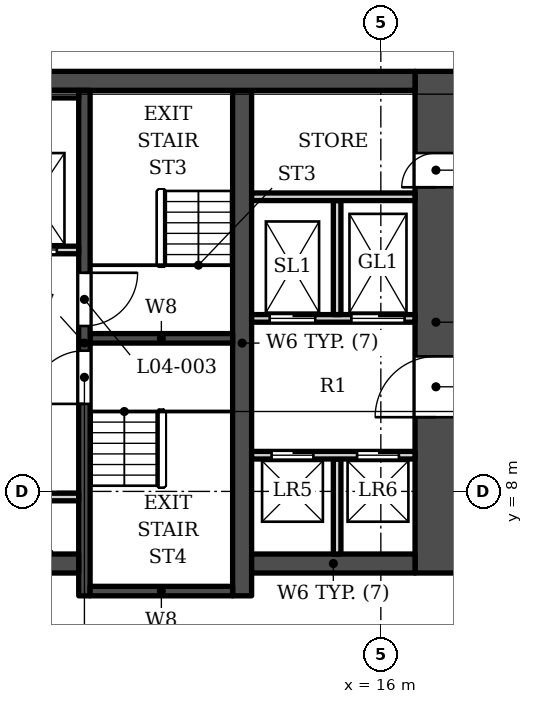
"""IFC4 building model, lengths in metres.
Left out: names, types, materials, properties, quantities, classifications, styles, units other than length and angle.
Written with IfcOpenShell. Run it as: python <this file> out.ifc"""

import sys

from ifc_helpers import new_model, si_unit, direction, frame, frame_2d, origin, place, context, subcontext, project, spatial, rectangle, extrude, element, fill, save


model = new_model("IFC4")
c1 = context("Model", 3, precision=1e-05, world=origin(), true_north=direction((0.0, 1.0)))
c2 = subcontext(c1, "Body", "Model", "MODEL_VIEW")
j1 = project(units=[si_unit("LENGTHUNIT", "METRE"), si_unit("PLANEANGLEUNIT", "RADIAN")], contexts=[c1])
p1 = place(None, origin())
s1 = spatial("IfcSite", under=j1, at=p1, CompositionType="ELEMENT")
p2 = place(p1, origin())
s2 = spatial("IfcBuilding", under=s1, at=p2, CompositionType="ELEMENT")
p3 = place(p2, frame((0.0, 0.0, 34.5)))
s3 = spatial("IfcBuildingStorey", under=s2, at=p3, CompositionType="ELEMENT", Elevation=34.5)
p4 = place(p3, frame((-16.9, 18.802, 0.0), z_axis=(0.0, 0.0, 1.0), x_axis=(1.0, 0.0, 0.0)))
e1 = element("IfcWall", 1, at=p4, inside=s3, PredefinedType="SHEAR", context=c2, shape_type="SweptSolid", body=[
    extrude(rectangle(XDim=33.8, YDim=0.5, at=frame_2d((16.9, 0.0))), origin(), (0.0, 0.0, 1.0), 5.5),
])
p5 = place(p3, frame((12.35, 5.253, 0.0), z_axis=(0.0, 0.0, 1.0), x_axis=(0.0, 1.0, 0.0)))
e2 = element("IfcWall", 2, at=p5, inside=s3, PredefinedType="SHEAR", context=c2, shape_type="SweptSolid", body=[
    extrude(rectangle(XDim=13.3, YDim=0.5, at=frame_2d((6.65, 0.0))), origin(), (0.0, 0.0, 1.0), 5.5),
])
p6 = place(p3, frame((8.2, 5.253, 0.0), z_axis=(0.0, 0.0, 1.0), x_axis=(0.0, 1.0, 0.0)))
e3 = element("IfcWall", 3, at=p6, inside=s3, PredefinedType="SHEAR", context=c2, shape_type="SweptSolid", body=[
    extrude(rectangle(XDim=13.3, YDim=0.3, at=frame_2d((6.65, 0.0))), origin(), (0.0, 0.0, 1.0), 5.5),
])
p7 = place(p6, frame((7.1, 0.0, 0.0)))
e4 = element("IfcOpeningElement", 4, at=p7, cuts=e3, PredefinedType="OPENING", context=c2, shape_type="SweptSolid", body=[
    extrude(rectangle(XDim=1.4, YDim=2.1, at=frame_2d((0.7, 1.05))), frame((0.0, 0.16, 0.0), z_axis=(0.0, -1.0, 0.0), x_axis=(1.0, 0.0, 0.0)), (0.0, 0.0, 1.0), 0.32),
])
p8 = place(p6, frame((5.05, 0.0, 0.0)))
e5 = element("IfcOpeningElement", 5, at=p8, cuts=e3, PredefinedType="OPENING", context=c2, shape_type="SweptSolid", body=[
    extrude(rectangle(XDim=1.4, YDim=2.1, at=frame_2d((0.7, 1.05))), frame((0.0, 0.16, 0.0), z_axis=(0.0, -1.0, 0.0), x_axis=(1.0, 0.0, 0.0)), (0.0, 0.0, 1.0), 0.32),
])
for number, where, z_axis, x_axis in (
    (6, (8.35, 12.028, 0.0), (0.0, 0.0, 1.0), (1.0, 0.0, 0.0)),
    (7, (8.35, 5.378, 0.0), (0.0, 0.0, 1.0), (1.0, 0.0, 0.0)),
):
    element("IfcWall", number, at=place(p3, frame(where, z_axis=z_axis, x_axis=x_axis)), inside=s3, PredefinedType="SHEAR", context=c2, shape_type="SweptSolid", body=[
        extrude(rectangle(XDim=3.75, YDim=0.25, at=frame_2d((1.875, 0.0))), origin(), (0.0, 0.0, 1.0), 5.5),
    ])
p9 = place(p3, frame((1.0, 6.103, 0.0), z_axis=(0.0, 0.0, 1.0), x_axis=(1.0, 0.0, 0.0)))
e8 = element("IfcWall", 8, at=p9, inside=s3, PredefinedType="SHEAR", context=c2, shape_type="SweptSolid", body=[
    extrude(rectangle(XDim=7.05, YDim=0.5, at=frame_2d((3.525, 0.0))), origin(), (0.0, 0.0, 1.0), 5.5),
])
p10 = place(p9, frame((5.325, 0.0, 0.0)))
e9 = element("IfcOpeningElement", 9, at=p10, cuts=e8, PredefinedType="OPENING", context=c2, shape_type="SweptSolid", body=[
    extrude(rectangle(XDim=0.9, YDim=2.1, at=frame_2d((0.45, 1.05))), frame((0.0, 0.26, 0.0), z_axis=(0.0, -1.0, 0.0), x_axis=(1.0, 0.0, 0.0)), (0.0, 0.0, 1.0), 0.52),
])
p11 = place(p3, frame((12.6, 6.103, 0.0), z_axis=(0.0, 0.0, 1.0), x_axis=(1.0, 0.0, 0.0)))
e10 = element("IfcWall", 10, at=p11, inside=s3, PredefinedType="SHEAR", context=c2, shape_type="SweptSolid", body=[
    extrude(rectangle(XDim=4.3, YDim=0.5, at=frame_2d((2.15, 0.0))), origin(), (0.0, 0.0, 1.0), 5.5),
])
p12 = place(p3, frame((17.45, 5.853, 0.0), z_axis=(0.0, 0.0, 1.0), x_axis=(0.0, 1.0, 0.0)))
e11 = element("IfcWall", 11, at=p12, inside=s3, PredefinedType="SHEAR", context=c2, shape_type="SweptSolid", body=[
    extrude(rectangle(XDim=13.2, YDim=1.1, at=frame_2d((6.6, 0.0))), origin(), (0.0, 0.0, 1.0), 5.5),
])
p13 = place(p12, frame((4.1, 0.0, 0.0)))
e12 = element("IfcOpeningElement", 12, at=p13, cuts=e11, PredefinedType="OPENING", context=c2, shape_type="SweptSolid", body=[
    extrude(rectangle(XDim=1.6, YDim=2.1, at=frame_2d((0.8, 1.05))), frame((0.0, 0.56, 0.0), z_axis=(0.0, -1.0, 0.0), x_axis=(1.0, 0.0, 0.0)), (0.0, 0.0, 1.0), 1.12),
])
p14 = place(p12, frame((10.15, 0.0, 0.0)))
e13 = element("IfcOpeningElement", 13, at=p14, cuts=e11, PredefinedType="OPENING", context=c2, shape_type="SweptSolid", body=[
    extrude(rectangle(XDim=0.9, YDim=2.1, at=frame_2d((0.45, 1.05))), frame((0.0, 0.56, 0.0), z_axis=(0.0, -1.0, 0.0), x_axis=(1.0, 0.0, 0.0)), (0.0, 0.0, 1.0), 1.12),
])
for number, where, z_axis, x_axis in (
    (14, (14.85, 6.353, 0.0), (0.0, 0.0, 1.0), (0.0, 1.0, 0.0)),
    (15, (5.55, 7.853, 0.0), (0.0, 0.0, 1.0), (1.0, 0.0, 0.0)),
):
    element("IfcWall", number, at=place(p3, frame(where, z_axis=z_axis, x_axis=x_axis)), inside=s3, PredefinedType="SOLIDWALL", context=c2, shape_type="SweptSolid", body=[
        extrude(rectangle(XDim=2.5, YDim=0.2, at=frame_2d((1.25, 0.0))), origin(), (0.0, 0.0, 1.0), 5.05),
    ])
p15 = place(p3, frame((12.6, 8.953, 0.0), z_axis=(0.0, 0.0, 1.0), x_axis=(1.0, 0.0, 0.0)))
e16 = element("IfcWall", 16, at=p15, inside=s3, PredefinedType="SOLIDWALL", context=c2, shape_type="SweptSolid", body=[
    extrude(rectangle(XDim=4.3, YDim=0.2, at=frame_2d((2.15, 0.0))), origin(), (0.0, 0.0, 1.0), 5.05),
])
p16 = place(p15, frame((0.525, 0.0, 0.0)))
e17 = element("IfcOpeningElement", 17, at=p16, cuts=e16, PredefinedType="OPENING", context=c2, shape_type="SweptSolid", body=[
    extrude(rectangle(XDim=1.1, YDim=2.1, at=frame_2d((0.55, 1.05))), frame((0.0, 0.11, 0.0), z_axis=(0.0, -1.0, 0.0), x_axis=(1.0, 0.0, 0.0)), (0.0, 0.0, 1.0), 0.22),
])
p17 = place(p15, frame((2.775, 0.0, 0.0)))
e18 = element("IfcOpeningElement", 18, at=p17, cuts=e16, PredefinedType="OPENING", context=c2, shape_type="SweptSolid", body=[
    extrude(rectangle(XDim=1.1, YDim=2.1, at=frame_2d((0.55, 1.05))), frame((0.0, 0.11, 0.0), z_axis=(0.0, -1.0, 0.0), x_axis=(1.0, 0.0, 0.0)), (0.0, 0.0, 1.0), 0.22),
])
p18 = place(p3, frame((12.6, 12.552, 0.0), z_axis=(0.0, 0.0, 1.0), x_axis=(1.0, 0.0, 0.0)))
e19 = element("IfcWall", 19, at=p18, inside=s3, PredefinedType="SOLIDWALL", context=c2, shape_type="SweptSolid", body=[
    extrude(rectangle(XDim=4.3, YDim=0.2, at=frame_2d((2.15, 0.0))), origin(), (0.0, 0.0, 1.0), 5.05),
])
p19 = place(p18, frame((0.475, 0.0, 0.0)))
e20 = element("IfcOpeningElement", 20, at=p19, cuts=e19, PredefinedType="OPENING", context=c2, shape_type="SweptSolid", body=[
    extrude(rectangle(XDim=1.2, YDim=2.1, at=frame_2d((0.6, 1.05))), frame((0.0, 0.11, 0.0), z_axis=(0.0, -1.0, 0.0), x_axis=(1.0, 0.0, 0.0)), (0.0, 0.0, 1.0), 0.22),
])
p20 = place(p18, frame((2.625, 0.0, 0.0)))
e21 = element("IfcOpeningElement", 21, at=p20, cuts=e19, PredefinedType="OPENING", context=c2, shape_type="SweptSolid", body=[
    extrude(rectangle(XDim=1.4, YDim=2.1, at=frame_2d((0.7, 1.05))), frame((0.0, 0.11, 0.0), z_axis=(0.0, -1.0, 0.0), x_axis=(1.0, 0.0, 0.0)), (0.0, 0.0, 1.0), 0.22),
])
p21 = place(p3, frame((14.85, 12.653, 0.0), z_axis=(0.0, 0.0, 1.0), x_axis=(0.0, 1.0, 0.0)))
e22 = element("IfcWall", 22, at=p21, inside=s3, PredefinedType="SOLIDWALL", context=c2, shape_type="SweptSolid", body=[
    extrude(rectangle(XDim=3.0, YDim=0.2, at=frame_2d((1.5, 0.0))), origin(), (0.0, 0.0, 1.0), 5.05),
])
p22 = place(p3, frame((5.3, 14.353, 0.0), z_axis=(0.0, 0.0, 1.0), x_axis=(1.0, 0.0, 0.0)))
e23 = element("IfcWall", 23, at=p22, inside=s3, PredefinedType="SOLIDWALL", context=c2, shape_type="SweptSolid", body=[
    extrude(rectangle(XDim=2.75, YDim=0.2, at=frame_2d((1.375, 0.0))), origin(), (0.0, 0.0, 1.0), 5.05),
])
p23 = place(p22, frame((0.975, 0.0, 0.0)))
e24 = element("IfcOpeningElement", 24, at=p23, cuts=e23, PredefinedType="OPENING", context=c2, shape_type="SweptSolid", body=[
    extrude(rectangle(XDim=1.2, YDim=2.1, at=frame_2d((0.6, 1.05))), frame((0.0, 0.11, 0.0), z_axis=(0.0, -1.0, 0.0), x_axis=(1.0, 0.0, 0.0)), (0.0, 0.0, 1.0), 0.22),
])
p24 = place(p3, frame((12.6, 15.753, 0.0), z_axis=(0.0, 0.0, 1.0), x_axis=(1.0, 0.0, 0.0)))
e25 = element("IfcWall", 25, at=p24, inside=s3, PredefinedType="SOLIDWALL", context=c2, shape_type="SweptSolid", body=[
    extrude(rectangle(XDim=4.3, YDim=0.2, at=frame_2d((2.15, 0.0))), origin(), (0.0, 0.0, 1.0), 5.05),
])
p25 = place(p3, frame((5.5, 18.453, 0.0), z_axis=(0.0, 0.0, 1.0), x_axis=(1.0, 0.0, 0.0)))
e26 = element("IfcWall", 26, at=p25, inside=s3, PredefinedType="SOLIDWALL", context=c2, shape_type="SweptSolid", body=[
    extrude(rectangle(XDim=2.55, YDim=0.2, at=frame_2d((1.275, 0.0))), origin(), (0.0, 0.0, 1.0), 5.05),
])
p26 = place(p23, origin())
e27 = element("IfcDoor", 27, at=p26, inside=s3, OperationType="DOUBLE_DOOR_SLIDING", PredefinedType="DOOR", context=c2, shape_type="SweptSolid", body=[
    extrude(rectangle(XDim=1.2, YDim=2.1, at=frame_2d((0.6, 1.05))), frame((0.0, 0.025, 0.0), z_axis=(0.0, -1.0, 0.0), x_axis=(1.0, 0.0, 0.0)), (0.0, 0.0, 1.0), 0.05),
])
fill(e24, e27)
p27 = place(p16, origin())
e28 = element("IfcDoor", 28, at=p27, inside=s3, OperationType="DOUBLE_DOOR_SLIDING", PredefinedType="DOOR", context=c2, shape_type="SweptSolid", body=[
    extrude(rectangle(XDim=1.1, YDim=2.1, at=frame_2d((0.55, 1.05))), frame((0.0, 0.025, 0.0), z_axis=(0.0, -1.0, 0.0), x_axis=(1.0, 0.0, 0.0)), (0.0, 0.0, 1.0), 0.05),
])
fill(e17, e28)
p28 = place(p17, origin())
e29 = element("IfcDoor", 29, at=p28, inside=s3, OperationType="DOUBLE_DOOR_SLIDING", PredefinedType="DOOR", context=c2, shape_type="SweptSolid", body=[
    extrude(rectangle(XDim=1.1, YDim=2.1, at=frame_2d((0.55, 1.05))), frame((0.0, 0.025, 0.0), z_axis=(0.0, -1.0, 0.0), x_axis=(1.0, 0.0, 0.0)), (0.0, 0.0, 1.0), 0.05),
])
fill(e18, e29)
p29 = place(p19, origin())
e30 = element("IfcDoor", 30, at=p29, inside=s3, OperationType="DOUBLE_DOOR_SLIDING", PredefinedType="DOOR", context=c2, shape_type="SweptSolid", body=[
    extrude(rectangle(XDim=1.2, YDim=2.1, at=frame_2d((0.6, 1.05))), frame((0.0, 0.025, 0.0), z_axis=(0.0, -1.0, 0.0), x_axis=(1.0, 0.0, 0.0)), (0.0, 0.0, 1.0), 0.05),
])
fill(e20, e30)
p30 = place(p20, origin())
e31 = element("IfcDoor", 31, at=p30, inside=s3, OperationType="DOUBLE_DOOR_SLIDING", PredefinedType="DOOR", context=c2, shape_type="SweptSolid", body=[
    extrude(rectangle(XDim=1.4, YDim=2.1, at=frame_2d((0.7, 1.05))), frame((0.0, 0.025, 0.0), z_axis=(0.0, -1.0, 0.0), x_axis=(1.0, 0.0, 0.0)), (0.0, 0.0, 1.0), 0.05),
])
fill(e21, e31)
p31 = place(p7, origin())
e32 = element("IfcDoor", 32, at=p31, inside=s3, OperationType="SINGLE_SWING_RIGHT", PredefinedType="DOOR", context=c2, shape_type="SweptSolid", body=[
    extrude(rectangle(XDim=1.4, YDim=2.1, at=frame_2d((0.7, 1.05))), frame((0.0, 0.025, 0.0), z_axis=(0.0, -1.0, 0.0), x_axis=(1.0, 0.0, 0.0)), (0.0, 0.0, 1.0), 0.05),
])
fill(e4, e32)
p32 = place(p8, origin())
e33 = element("IfcDoor", 33, at=p32, inside=s3, OperationType="SINGLE_SWING_LEFT", PredefinedType="DOOR", context=c2, shape_type="SweptSolid", body=[
    extrude(rectangle(XDim=1.4, YDim=2.1, at=frame_2d((0.7, 1.05))), frame((0.0, 0.025, 0.0), z_axis=(0.0, -1.0, 0.0), x_axis=(1.0, 0.0, 0.0)), (0.0, 0.0, 1.0), 0.05),
])
fill(e5, e33)
p33 = place(p13, origin())
e34 = element("IfcDoor", 34, at=p33, inside=s3, OperationType="DOUBLE_DOOR_SINGLE_SWING", PredefinedType="DOOR", context=c2, shape_type="SweptSolid", body=[
    extrude(rectangle(XDim=1.6, YDim=2.1, at=frame_2d((0.8, 1.05))), frame((0.0, 0.275, 0.0), z_axis=(0.0, -1.0, 0.0), x_axis=(1.0, 0.0, 0.0)), (0.0, 0.0, 1.0), 0.05),
])
fill(e12, e34)
p34 = place(p14, origin())
e35 = element("IfcDoor", 35, at=p34, inside=s3, OperationType="SINGLE_SWING_LEFT", PredefinedType="DOOR", context=c2, shape_type="SweptSolid", body=[
    extrude(rectangle(XDim=0.9, YDim=2.1, at=frame_2d((0.45, 1.05))), frame((0.0, 0.275, 0.0), z_axis=(0.0, -1.0, 0.0), x_axis=(1.0, 0.0, 0.0)), (0.0, 0.0, 1.0), 0.05),
])
fill(e13, e35)
save(model, sys.argv[1])
